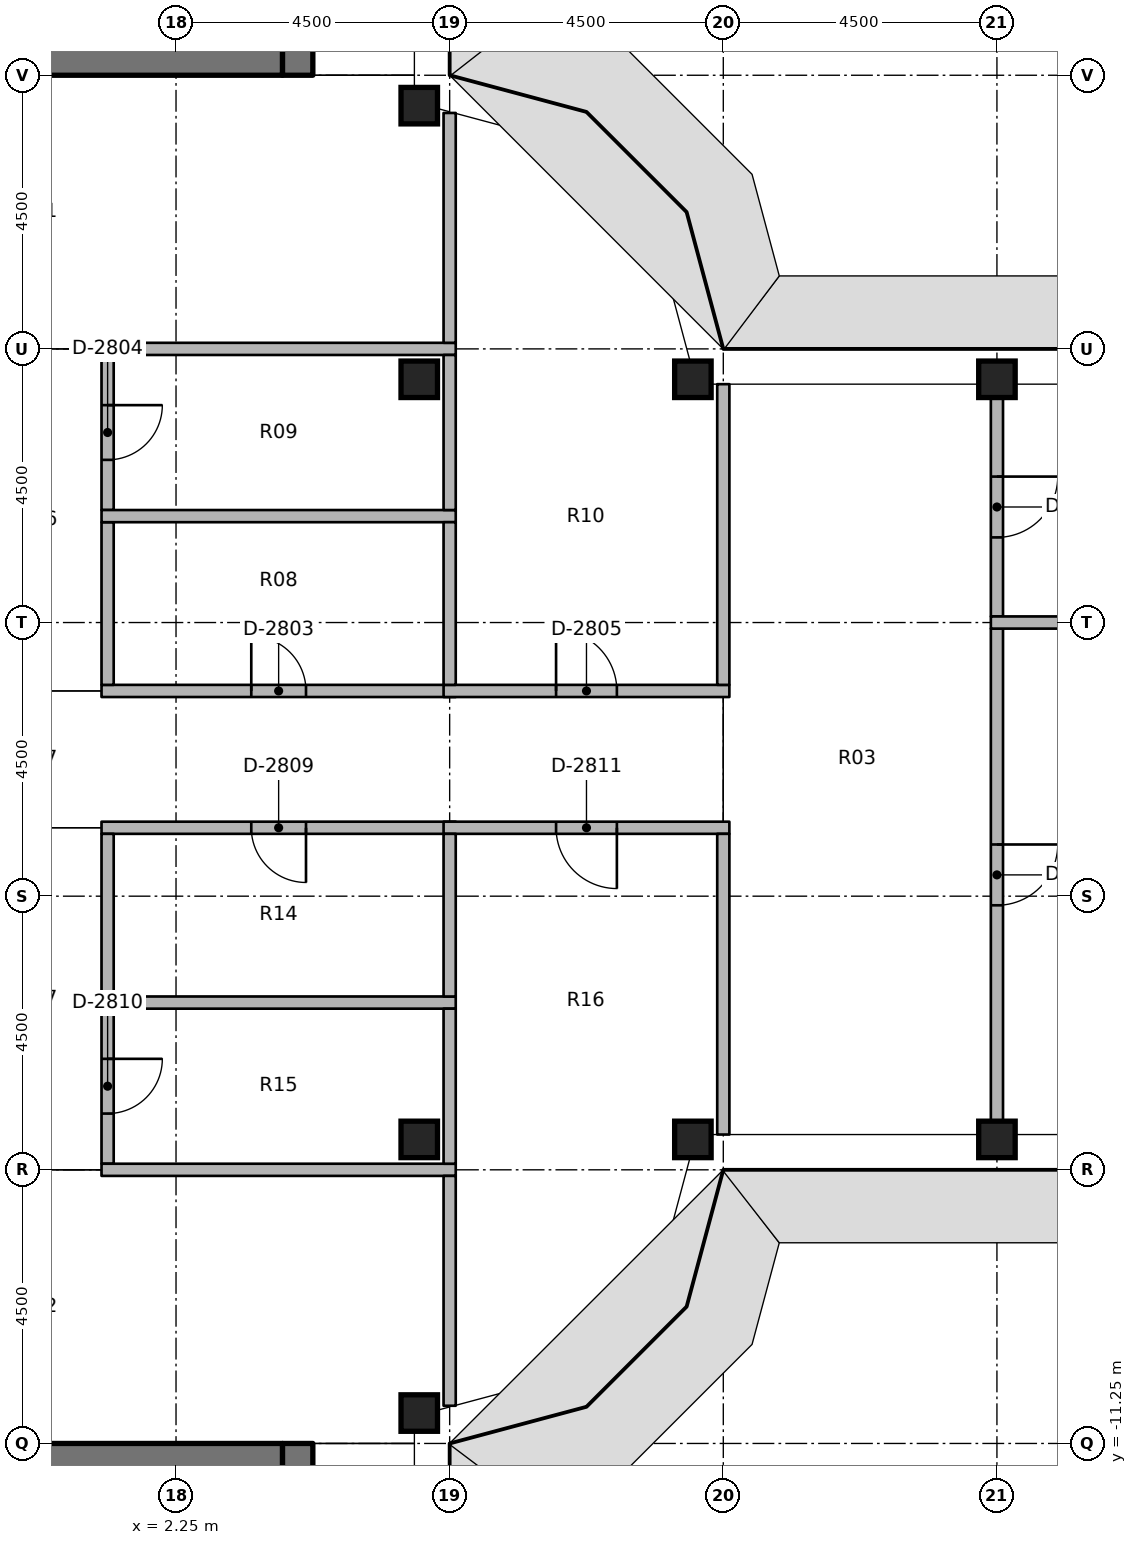
"""IFC4 building model, lengths in metres.
Left out: names, types, materials, properties, quantities, classifications, styles, units other than length and angle.
Written with IfcOpenShell. Run it as: python <this file> out.ifc"""

import sys

from ifc_helpers import new_model, si_unit, direction, frame, frame_2d, origin, origin_2d, place, context, subcontext, project, spatial, rectangle, extrude, element, fill, save


model = new_model("IFC4")
c1 = context("Model", 3, precision=1e-05, world=origin(), true_north=direction((0.0, 1.0)))
c2 = subcontext(c1, "Body", "Model", "MODEL_VIEW")
j1 = project(units=[si_unit("LENGTHUNIT", "METRE"), si_unit("PLANEANGLEUNIT", "RADIAN")], contexts=[c1])
p1 = place(None, origin())
s1 = spatial("IfcSite", under=j1, at=p1, CompositionType="ELEMENT")
p2 = place(p1, origin())
s2 = spatial("IfcBuilding", under=s1, at=p2, CompositionType="ELEMENT")
p3 = place(p2, frame((0.0, 0.0, 265.0)))
s3 = spatial("IfcBuildingStorey", under=s2, at=p3, CompositionType="ELEMENT", Elevation=265.0)
for number, where, z_axis, x_axis in (
    (1, (6.25, -10.75, 0.0), (0.0, 0.0, 1.0), (1.0, 0.0, 0.0)),
    (2, (6.25, -6.25, 0.0), (0.0, 0.0, 1.0), (1.0, 0.0, 0.0)),
    (3, (6.25, 6.25, 0.0), (0.0, 0.0, 1.0), (1.0, 0.0, 0.0)),
    (4, (6.25, 10.75, 0.0), (0.0, 0.0, 1.0), (1.0, 0.0, 0.0)),
    (5, (10.75, -6.25, 0.0), (0.0, 0.0, 1.0), (1.0, 0.0, 0.0)),
    (6, (10.75, 6.25, 0.0), (0.0, 0.0, 1.0), (1.0, 0.0, 0.0)),
    (7, (15.75, -6.25, 0.0), (0.0, 0.0, 1.0), (1.0, 0.0, 0.0)),
    (8, (15.75, 6.25, 0.0), (0.0, 0.0, 1.0), (1.0, 0.0, 0.0)),
):
    element("IfcColumn", number, at=place(p3, frame(where, z_axis=z_axis, x_axis=x_axis)), inside=s3, PredefinedType="COLUMN", context=c2, shape_type="SweptSolid", body=[
        extrude(rectangle(XDim=0.6, YDim=0.6, at=origin_2d()), origin(), (0.0, 0.0, 1.0), 3.65),
    ])
p4 = place(p3, frame((4.25, 11.25, 0.0), z_axis=(0.0, 0.0, 1.0), x_axis=(0.0, 1.0, 0.0)))
e9 = element("IfcWall", 9, at=p4, inside=s3, PredefinedType="SHEAR", context=c2, shape_type="SweptSolid", body=[
    extrude(rectangle(XDim=15.0, YDim=0.5, at=frame_2d((7.5, 0.0))), origin(), (0.0, 0.0, 1.0), 3.8),
])
p5 = place(p4, frame((7.15, 0.0, 0.0)))
e10 = element("IfcOpeningElement", 10, at=p5, cuts=e9, PredefinedType="OPENING", context=c2, shape_type="SweptSolid", body=[
    extrude(rectangle(XDim=1.5, YDim=2.3, at=frame_2d((0.75, 1.15))), frame((0.0, 0.26, 0.0), z_axis=(0.0, -1.0, 0.0), x_axis=(1.0, 0.0, 0.0)), (0.0, 0.0, 1.0), 0.52),
])
p6 = place(p4, frame((5.55, 0.0, 0.0)))
e11 = element("IfcOpeningElement", 11, at=p6, cuts=e9, PredefinedType="OPENING", context=c2, shape_type="SweptSolid", body=[
    extrude(rectangle(XDim=1.2, YDim=2.1, at=frame_2d((0.6, 1.05))), frame((0.0, 0.26, 0.0), z_axis=(0.0, -1.0, 0.0), x_axis=(1.0, 0.0, 0.0)), (0.0, 0.0, 1.0), 0.52),
])
p7 = place(p3, frame((-4.0, 11.5, 0.0), z_axis=(0.0, 0.0, 1.0), x_axis=(1.0, 0.0, 0.0)))
e12 = element("IfcWall", 12, at=p7, inside=s3, PredefinedType="SHEAR", context=c2, shape_type="SweptSolid", body=[
    extrude(rectangle(XDim=8.0, YDim=0.5, at=frame_2d((4.0, 0.0))), origin(), (0.0, 0.0, 1.0), 3.8),
])
p8 = place(p3, frame((4.25, -11.25, 0.0), z_axis=(0.0, 0.0, 1.0), x_axis=(0.0, -1.0, 0.0)))
e13 = element("IfcWall", 13, at=p8, inside=s3, PredefinedType="SHEAR", context=c2, shape_type="SweptSolid", body=[
    extrude(rectangle(XDim=15.0, YDim=0.5, at=frame_2d((7.5, 0.0))), origin(), (0.0, 0.0, 1.0), 3.8),
])
p9 = place(p8, frame((7.15, 0.0, 0.0)))
e14 = element("IfcOpeningElement", 14, at=p9, cuts=e13, PredefinedType="OPENING", context=c2, shape_type="SweptSolid", body=[
    extrude(rectangle(XDim=1.5, YDim=2.3, at=frame_2d((0.75, 1.15))), frame((0.0, 0.26, 0.0), z_axis=(0.0, -1.0, 0.0), x_axis=(1.0, 0.0, 0.0)), (0.0, 0.0, 1.0), 0.52),
])
p10 = place(p8, frame((13.9, 0.0, 0.0)))
e15 = element("IfcOpeningElement", 15, at=p10, cuts=e13, PredefinedType="OPENING", context=c2, shape_type="SweptSolid", body=[
    extrude(rectangle(XDim=0.9, YDim=2.1, at=frame_2d((0.45, 1.05))), frame((0.0, 0.26, 0.0), z_axis=(0.0, -1.0, 0.0), x_axis=(1.0, 0.0, 0.0)), (0.0, 0.0, 1.0), 0.52),
])
p11 = place(p8, frame((1.15, 0.0, 0.0)))
e16 = element("IfcOpeningElement", 16, at=p11, cuts=e13, PredefinedType="OPENING", context=c2, shape_type="SweptSolid", body=[
    extrude(rectangle(XDim=1.2, YDim=2.1, at=frame_2d((0.6, 1.05))), frame((0.0, 0.26, 0.0), z_axis=(0.0, -1.0, 0.0), x_axis=(1.0, 0.0, 0.0)), (0.0, 0.0, 1.0), 0.52),
])
p12 = place(p3, frame((-4.0, -11.5, 0.0), z_axis=(0.0, 0.0, 1.0), x_axis=(1.0, 0.0, 0.0)))
e17 = element("IfcWall", 17, at=p12, inside=s3, PredefinedType="SHEAR", context=c2, shape_type="SweptSolid", body=[
    extrude(rectangle(XDim=8.0, YDim=0.5, at=frame_2d((4.0, 0.0))), origin(), (0.0, 0.0, 1.0), 3.8),
])
p13 = place(p3, frame((1.025, 1.125, 0.0), z_axis=(0.0, 0.0, 1.0), x_axis=(1.0, 0.0, 0.0)))
e18 = element("IfcWall", 18, at=p13, inside=s3, PredefinedType="PARTITIONING", context=c2, shape_type="SweptSolid", body=[
    extrude(rectangle(XDim=5.825, YDim=0.2, at=frame_2d((2.913, 0.0))), origin(), (0.0, 0.0, 1.0), 2.75),
])
p14 = place(p13, frame((2.462, 0.0, 0.0)))
e19 = element("IfcOpeningElement", 19, at=p14, cuts=e18, PredefinedType="OPENING", context=c2, shape_type="SweptSolid", body=[
    extrude(rectangle(XDim=0.9, YDim=2.1, at=frame_2d((0.45, 1.05))), frame((0.0, 0.11, 0.0), z_axis=(0.0, -1.0, 0.0), x_axis=(1.0, 0.0, 0.0)), (0.0, 0.0, 1.0), 0.22),
])
p15 = place(p3, frame((6.65, 1.125, 0.0), z_axis=(0.0, 0.0, 1.0), x_axis=(1.0, 0.0, 0.0)))
e20 = element("IfcWall", 20, at=p15, inside=s3, PredefinedType="PARTITIONING", context=c2, shape_type="SweptSolid", body=[
    extrude(rectangle(XDim=4.7, YDim=0.2, at=frame_2d((2.35, 0.0))), origin(), (0.0, 0.0, 1.0), 2.75),
])
p16 = place(p15, frame((1.85, 0.0, 0.0)))
e21 = element("IfcOpeningElement", 21, at=p16, cuts=e20, PredefinedType="OPENING", context=c2, shape_type="SweptSolid", body=[
    extrude(rectangle(XDim=1.0, YDim=2.1, at=frame_2d((0.5, 1.05))), frame((0.0, 0.11, 0.0), z_axis=(0.0, -1.0, 0.0), x_axis=(1.0, 0.0, 0.0)), (0.0, 0.0, 1.0), 0.22),
])
p17 = place(p3, frame((6.85, -1.125, 0.0), z_axis=(0.0, 0.0, 1.0), x_axis=(-1.0, 0.0, 0.0)))
e22 = element("IfcWall", 22, at=p17, inside=s3, PredefinedType="PARTITIONING", context=c2, shape_type="SweptSolid", body=[
    extrude(rectangle(XDim=5.825, YDim=0.2, at=frame_2d((2.913, 0.0))), origin(), (0.0, 0.0, 1.0), 2.75),
])
p18 = place(p17, frame((2.462, 0.0, 0.0)))
e23 = element("IfcOpeningElement", 23, at=p18, cuts=e22, PredefinedType="OPENING", context=c2, shape_type="SweptSolid", body=[
    extrude(rectangle(XDim=0.9, YDim=2.1, at=frame_2d((0.45, 1.05))), frame((0.0, 0.11, 0.0), z_axis=(0.0, -1.0, 0.0), x_axis=(1.0, 0.0, 0.0)), (0.0, 0.0, 1.0), 0.22),
])
p19 = place(p3, frame((11.35, -1.125, 0.0), z_axis=(0.0, 0.0, 1.0), x_axis=(-1.0, 0.0, 0.0)))
e24 = element("IfcWall", 24, at=p19, inside=s3, PredefinedType="PARTITIONING", context=c2, shape_type="SweptSolid", body=[
    extrude(rectangle(XDim=4.7, YDim=0.2, at=frame_2d((2.35, 0.0))), origin(), (0.0, 0.0, 1.0), 2.75),
])
p20 = place(p19, frame((1.85, 0.0, 0.0)))
e25 = element("IfcOpeningElement", 25, at=p20, cuts=e24, PredefinedType="OPENING", context=c2, shape_type="SweptSolid", body=[
    extrude(rectangle(XDim=1.0, YDim=2.1, at=frame_2d((0.5, 1.05))), frame((0.0, 0.11, 0.0), z_axis=(0.0, -1.0, 0.0), x_axis=(1.0, 0.0, 0.0)), (0.0, 0.0, 1.0), 0.22),
])
p21 = place(p3, frame((1.125, 1.225, 0.0), z_axis=(0.0, 0.0, 1.0), x_axis=(0.0, 1.0, 0.0)))
e26 = element("IfcWall", 26, at=p21, inside=s3, PredefinedType="PARTITIONING", context=c2, shape_type="SweptSolid", body=[
    extrude(rectangle(XDim=2.675, YDim=0.2, at=frame_2d((1.337, 0.0))), origin(), (0.0, 0.0, 1.0), 2.75),
])
p22 = place(p3, frame((1.125, 6.65, 0.0), z_axis=(0.0, 0.0, 1.0), x_axis=(0.0, -1.0, 0.0)))
e27 = element("IfcWall", 27, at=p22, inside=s3, PredefinedType="PARTITIONING", context=c2, shape_type="SweptSolid", body=[
    extrude(rectangle(XDim=2.55, YDim=0.2, at=frame_2d((1.275, 0.0))), origin(), (0.0, 0.0, 1.0), 2.75),
])
p23 = place(p22, frame((0.825, 0.0, 0.0)))
e28 = element("IfcOpeningElement", 28, at=p23, cuts=e27, PredefinedType="OPENING", context=c2, shape_type="SweptSolid", body=[
    extrude(rectangle(XDim=0.9, YDim=2.1, at=frame_2d((0.45, 1.05))), frame((0.0, 0.11, 0.0), z_axis=(0.0, -1.0, 0.0), x_axis=(1.0, 0.0, 0.0)), (0.0, 0.0, 1.0), 0.22),
])
p24 = place(p3, frame((1.125, -3.9, 0.0), z_axis=(0.0, 0.0, 1.0), x_axis=(0.0, 1.0, 0.0)))
e29 = element("IfcWall", 29, at=p24, inside=s3, PredefinedType="PARTITIONING", context=c2, shape_type="SweptSolid", body=[
    extrude(rectangle(XDim=2.675, YDim=0.2, at=frame_2d((1.337, 0.0))), origin(), (0.0, 0.0, 1.0), 2.75),
])
p25 = place(p3, frame((1.125, -4.1, 0.0), z_axis=(0.0, 0.0, 1.0), x_axis=(0.0, -1.0, 0.0)))
e30 = element("IfcWall", 30, at=p25, inside=s3, PredefinedType="PARTITIONING", context=c2, shape_type="SweptSolid", body=[
    extrude(rectangle(XDim=2.55, YDim=0.2, at=frame_2d((1.275, 0.0))), origin(), (0.0, 0.0, 1.0), 2.75),
])
p26 = place(p25, frame((0.825, 0.0, 0.0)))
e31 = element("IfcOpeningElement", 31, at=p26, cuts=e30, PredefinedType="OPENING", context=c2, shape_type="SweptSolid", body=[
    extrude(rectangle(XDim=0.9, YDim=2.1, at=frame_2d((0.45, 1.05))), frame((0.0, 0.11, 0.0), z_axis=(0.0, -1.0, 0.0), x_axis=(1.0, 0.0, 0.0)), (0.0, 0.0, 1.0), 0.22),
])
p27 = place(p3, frame((1.025, 6.75, 0.0), z_axis=(0.0, 0.0, 1.0), x_axis=(1.0, 0.0, 0.0)))
e32 = element("IfcWall", 32, at=p27, inside=s3, PredefinedType="PARTITIONING", context=c2, shape_type="SweptSolid", body=[
    extrude(rectangle(XDim=5.825, YDim=0.2, at=frame_2d((2.913, 0.0))), origin(), (0.0, 0.0, 1.0), 2.75),
])
p28 = place(p3, frame((6.75, 6.85, 0.0), z_axis=(0.0, 0.0, 1.0), x_axis=(0.0, 1.0, 0.0)))
e33 = element("IfcWall", 33, at=p28, inside=s3, PredefinedType="PARTITIONING", context=c2, shape_type="SweptSolid", body=[
    extrude(rectangle(XDim=3.78, YDim=0.2, at=frame_2d((1.89, 0.0))), origin(), (0.0, 0.0, 1.0), 2.75),
])
p29 = place(p3, frame((1.025, -6.75, 0.0), z_axis=(0.0, 0.0, 1.0), x_axis=(1.0, 0.0, 0.0)))
e34 = element("IfcWall", 34, at=p29, inside=s3, PredefinedType="PARTITIONING", context=c2, shape_type="SweptSolid", body=[
    extrude(rectangle(XDim=5.825, YDim=0.2, at=frame_2d((2.913, 0.0))), origin(), (0.0, 0.0, 1.0), 2.75),
])
p30 = place(p3, frame((6.75, -10.63, 0.0), z_axis=(0.0, 0.0, 1.0), x_axis=(0.0, 1.0, 0.0)))
e35 = element("IfcWall", 35, at=p30, inside=s3, PredefinedType="PARTITIONING", context=c2, shape_type="SweptSolid", body=[
    extrude(rectangle(XDim=3.78, YDim=0.2, at=frame_2d((1.89, 0.0))), origin(), (0.0, 0.0, 1.0), 2.75),
])
p31 = place(p3, frame((1.025, 4.0, 0.0), z_axis=(0.0, 0.0, 1.0), x_axis=(1.0, 0.0, 0.0)))
e36 = element("IfcWall", 36, at=p31, inside=s3, PredefinedType="PARTITIONING", context=c2, shape_type="SweptSolid", body=[
    extrude(rectangle(XDim=5.825, YDim=0.2, at=frame_2d((2.913, 0.0))), origin(), (0.0, 0.0, 1.0), 2.75),
])
p32 = place(p3, frame((6.75, 1.225, 0.0), z_axis=(0.0, 0.0, 1.0), x_axis=(0.0, 1.0, 0.0)))
e37 = element("IfcWall", 37, at=p32, inside=s3, PredefinedType="PARTITIONING", context=c2, shape_type="SweptSolid", body=[
    extrude(rectangle(XDim=2.675, YDim=0.2, at=frame_2d((1.337, 0.0))), origin(), (0.0, 0.0, 1.0), 2.75),
])
p33 = place(p3, frame((6.75, 4.1, 0.0), z_axis=(0.0, 0.0, 1.0), x_axis=(0.0, 1.0, 0.0)))
e38 = element("IfcWall", 38, at=p33, inside=s3, PredefinedType="PARTITIONING", context=c2, shape_type="SweptSolid", body=[
    extrude(rectangle(XDim=2.55, YDim=0.2, at=frame_2d((1.275, 0.0))), origin(), (0.0, 0.0, 1.0), 2.75),
])
p34 = place(p3, frame((11.25, 1.225, 0.0), z_axis=(0.0, 0.0, 1.0), x_axis=(0.0, 1.0, 0.0)))
e39 = element("IfcWall", 39, at=p34, inside=s3, PredefinedType="PARTITIONING", context=c2, shape_type="SweptSolid", body=[
    extrude(rectangle(XDim=4.945, YDim=0.2, at=frame_2d((2.472, 0.0))), origin(), (0.0, 0.0, 1.0), 2.75),
])
p35 = place(p3, frame((1.025, -4.0, 0.0), z_axis=(0.0, 0.0, 1.0), x_axis=(1.0, 0.0, 0.0)))
e40 = element("IfcWall", 40, at=p35, inside=s3, PredefinedType="PARTITIONING", context=c2, shape_type="SweptSolid", body=[
    extrude(rectangle(XDim=5.825, YDim=0.2, at=frame_2d((2.913, 0.0))), origin(), (0.0, 0.0, 1.0), 2.75),
])
p36 = place(p3, frame((6.75, -3.9, 0.0), z_axis=(0.0, 0.0, 1.0), x_axis=(0.0, 1.0, 0.0)))
e41 = element("IfcWall", 41, at=p36, inside=s3, PredefinedType="PARTITIONING", context=c2, shape_type="SweptSolid", body=[
    extrude(rectangle(XDim=2.675, YDim=0.2, at=frame_2d((1.337, 0.0))), origin(), (0.0, 0.0, 1.0), 2.75),
])
p37 = place(p3, frame((6.75, -6.65, 0.0), z_axis=(0.0, 0.0, 1.0), x_axis=(0.0, 1.0, 0.0)))
e42 = element("IfcWall", 42, at=p37, inside=s3, PredefinedType="PARTITIONING", context=c2, shape_type="SweptSolid", body=[
    extrude(rectangle(XDim=2.55, YDim=0.2, at=frame_2d((1.275, 0.0))), origin(), (0.0, 0.0, 1.0), 2.75),
])
p38 = place(p3, frame((11.25, -6.17, 0.0), z_axis=(0.0, 0.0, 1.0), x_axis=(0.0, 1.0, 0.0)))
e43 = element("IfcWall", 43, at=p38, inside=s3, PredefinedType="PARTITIONING", context=c2, shape_type="SweptSolid", body=[
    extrude(rectangle(XDim=4.945, YDim=0.2, at=frame_2d((2.472, 0.0))), origin(), (0.0, 0.0, 1.0), 2.75),
])
p39 = place(p3, frame((15.75, 2.15, 0.0), z_axis=(0.0, 0.0, 1.0), x_axis=(0.0, -1.0, 0.0)))
e44 = element("IfcWall", 44, at=p39, inside=s3, PredefinedType="PARTITIONING", context=c2, shape_type="SweptSolid", body=[
    extrude(rectangle(XDim=8.1, YDim=0.2, at=frame_2d((4.05, 0.0))), origin(), (0.0, 0.0, 1.0), 2.75),
])
p40 = place(p39, frame((3.55, 0.0, 0.0)))
e45 = element("IfcOpeningElement", 45, at=p40, cuts=e44, PredefinedType="OPENING", context=c2, shape_type="SweptSolid", body=[
    extrude(rectangle(XDim=1.0, YDim=2.1, at=frame_2d((0.5, 1.05))), frame((0.0, 0.11, 0.0), z_axis=(0.0, -1.0, 0.0), x_axis=(1.0, 0.0, 0.0)), (0.0, 0.0, 1.0), 0.22),
])
p41 = place(p3, frame((15.75, 5.95, 0.0), z_axis=(0.0, 0.0, 1.0), x_axis=(0.0, -1.0, 0.0)))
e46 = element("IfcWall", 46, at=p41, inside=s3, PredefinedType="PARTITIONING", context=c2, shape_type="SweptSolid", body=[
    extrude(rectangle(XDim=3.6, YDim=0.2, at=frame_2d((1.8, 0.0))), origin(), (0.0, 0.0, 1.0), 2.75),
])
p42 = place(p41, frame((1.3, 0.0, 0.0)))
e47 = element("IfcOpeningElement", 47, at=p42, cuts=e46, PredefinedType="OPENING", context=c2, shape_type="SweptSolid", body=[
    extrude(rectangle(XDim=1.0, YDim=2.1, at=frame_2d((0.5, 1.05))), frame((0.0, 0.11, 0.0), z_axis=(0.0, -1.0, 0.0), x_axis=(1.0, 0.0, 0.0)), (0.0, 0.0, 1.0), 0.22),
])
p43 = place(p3, frame((15.65, 2.25, 0.0), z_axis=(0.0, 0.0, 1.0), x_axis=(1.0, 0.0, 0.0)))
e48 = element("IfcWall", 48, at=p43, inside=s3, PredefinedType="PARTITIONING", context=c2, shape_type="SweptSolid", body=[
    extrude(rectangle(XDim=12.72, YDim=0.2, at=frame_2d((6.36, 0.0))), origin(), (0.0, 0.0, 1.0), 2.75),
])
p44 = place(p40, origin())
e49 = element("IfcDoor", 49, at=p44, inside=s3, OperationType="SINGLE_SWING_RIGHT", PredefinedType="DOOR", context=c2, shape_type="SweptSolid", body=[
    extrude(rectangle(XDim=1.0, YDim=2.1, at=frame_2d((0.5, 1.05))), frame((0.0, 0.025, 0.0), z_axis=(0.0, -1.0, 0.0), x_axis=(1.0, 0.0, 0.0)), (0.0, 0.0, 1.0), 0.05),
])
fill(e45, e49)
p45 = place(p42, origin())
e50 = element("IfcDoor", 50, at=p45, inside=s3, OperationType="SINGLE_SWING_LEFT", PredefinedType="DOOR", context=c2, shape_type="SweptSolid", body=[
    extrude(rectangle(XDim=1.0, YDim=2.1, at=frame_2d((0.5, 1.05))), frame((0.0, 0.025, 0.0), z_axis=(0.0, -1.0, 0.0), x_axis=(1.0, 0.0, 0.0)), (0.0, 0.0, 1.0), 0.05),
])
fill(e47, e50)
p46 = place(p14, origin())
e51 = element("IfcDoor", 51, at=p46, inside=s3, OperationType="SINGLE_SWING_RIGHT", PredefinedType="DOOR", context=c2, shape_type="SweptSolid", body=[
    extrude(rectangle(XDim=0.9, YDim=2.1, at=frame_2d((0.45, 1.05))), frame((0.0, 0.025, 0.0), z_axis=(0.0, -1.0, 0.0), x_axis=(1.0, 0.0, 0.0)), (0.0, 0.0, 1.0), 0.05),
])
fill(e19, e51)
p47 = place(p23, origin())
e52 = element("IfcDoor", 52, at=p47, inside=s3, OperationType="SINGLE_SWING_RIGHT", PredefinedType="DOOR", context=c2, shape_type="SweptSolid", body=[
    extrude(rectangle(XDim=0.9, YDim=2.1, at=frame_2d((0.45, 1.05))), frame((0.0, 0.025, 0.0), z_axis=(0.0, -1.0, 0.0), x_axis=(1.0, 0.0, 0.0)), (0.0, 0.0, 1.0), 0.05),
])
fill(e28, e52)
p48 = place(p16, origin())
e53 = element("IfcDoor", 53, at=p48, inside=s3, OperationType="SINGLE_SWING_RIGHT", PredefinedType="DOOR", context=c2, shape_type="SweptSolid", body=[
    extrude(rectangle(XDim=1.0, YDim=2.1, at=frame_2d((0.5, 1.05))), frame((0.0, 0.025, 0.0), z_axis=(0.0, -1.0, 0.0), x_axis=(1.0, 0.0, 0.0)), (0.0, 0.0, 1.0), 0.05),
])
fill(e21, e53)
p49 = place(p18, origin())
e54 = element("IfcDoor", 54, at=p49, inside=s3, OperationType="SINGLE_SWING_RIGHT", PredefinedType="DOOR", context=c2, shape_type="SweptSolid", body=[
    extrude(rectangle(XDim=0.9, YDim=2.1, at=frame_2d((0.45, 1.05))), frame((0.0, 0.025, 0.0), z_axis=(0.0, -1.0, 0.0), x_axis=(1.0, 0.0, 0.0)), (0.0, 0.0, 1.0), 0.05),
])
fill(e23, e54)
p50 = place(p26, origin())
e55 = element("IfcDoor", 55, at=p50, inside=s3, OperationType="SINGLE_SWING_RIGHT", PredefinedType="DOOR", context=c2, shape_type="SweptSolid", body=[
    extrude(rectangle(XDim=0.9, YDim=2.1, at=frame_2d((0.45, 1.05))), frame((0.0, 0.025, 0.0), z_axis=(0.0, -1.0, 0.0), x_axis=(1.0, 0.0, 0.0)), (0.0, 0.0, 1.0), 0.05),
])
fill(e31, e55)
p51 = place(p20, origin())
e56 = element("IfcDoor", 56, at=p51, inside=s3, OperationType="SINGLE_SWING_RIGHT", PredefinedType="DOOR", context=c2, shape_type="SweptSolid", body=[
    extrude(rectangle(XDim=1.0, YDim=2.1, at=frame_2d((0.5, 1.05))), frame((0.0, 0.025, 0.0), z_axis=(0.0, -1.0, 0.0), x_axis=(1.0, 0.0, 0.0)), (0.0, 0.0, 1.0), 0.05),
])
fill(e25, e56)
save(model, sys.argv[1])
